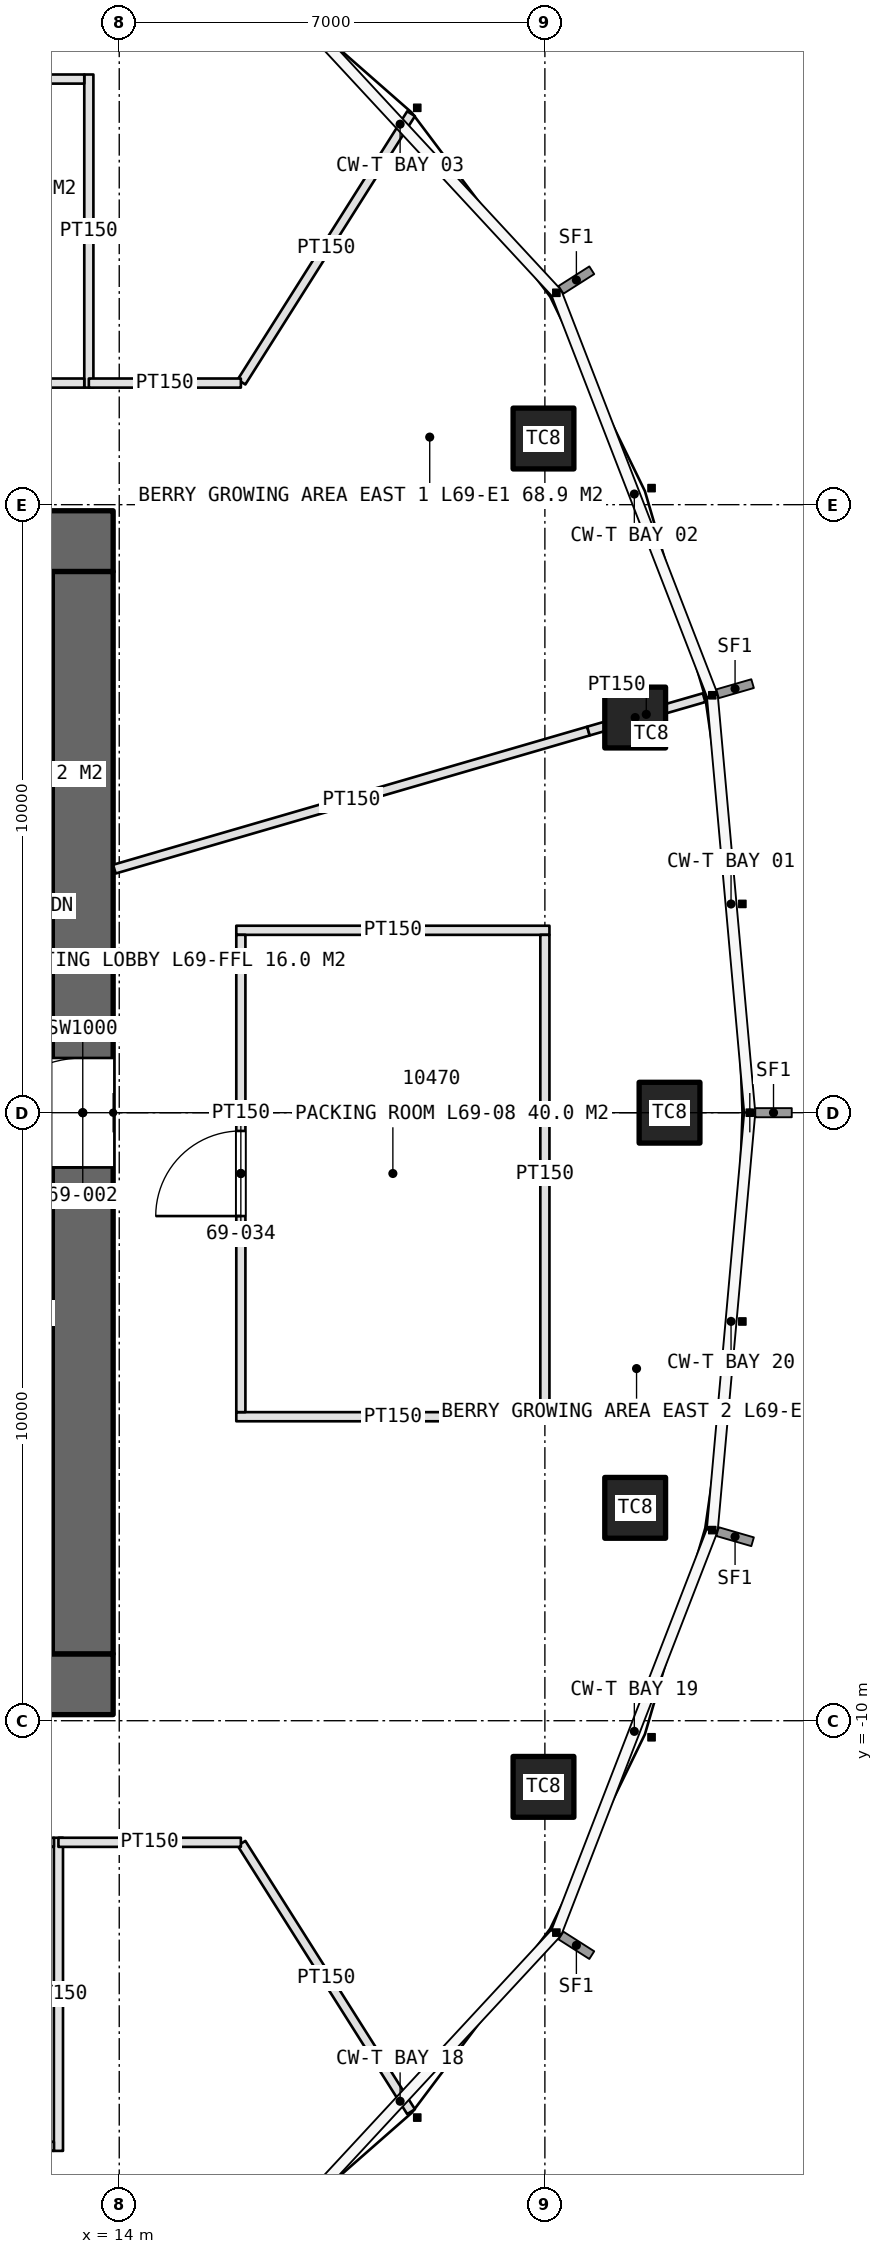
"""IFC4 building model, lengths in metres.
Left out: names, types, materials, properties, quantities, classifications, styles, units other than length and angle.
Written with IfcOpenShell. Run it as: python <this file> out.ifc"""

import sys

from ifc_helpers import new_model, si_unit, direction, frame, frame_2d, origin, origin_2d, place, context, subcontext, project, spatial, rectangle, extrude, element, fill, save


model = new_model("IFC4")
c1 = context("Model", 3, precision=1e-05, world=origin(), true_north=direction((0.0, 1.0)))
c2 = subcontext(c1, "Body", "Model", "MODEL_VIEW")
j1 = project(units=[si_unit("LENGTHUNIT", "METRE"), si_unit("PLANEANGLEUNIT", "RADIAN")], contexts=[c1])
p1 = place(None, origin())
s1 = spatial("IfcSite", under=j1, at=p1, CompositionType="ELEMENT")
p2 = place(p1, origin())
s2 = spatial("IfcBuilding", under=s1, at=p2, CompositionType="ELEMENT")
p3 = place(p2, frame((0.0, 0.0, 309.0)))
s3 = spatial("IfcBuildingStorey", under=s2, at=p3, CompositionType="ELEMENT", Elevation=309.0)
p4 = place(p3, frame((-13.9, -9.4, 0.0), z_axis=(0.0, 0.0, 1.0), x_axis=(1.0, 0.0, 0.0)))
e1 = element("IfcWall", 1, at=p4, inside=s3, PredefinedType="SHEAR", context=c2, shape_type="SweptSolid", body=[
    extrude(rectangle(XDim=27.8, YDim=1.0, at=frame_2d((13.9, 0.0))), origin(), (0.0, 0.0, 1.0), 4.2),
])
p5 = place(p4, frame((22.95, 0.0, 0.0)))
e2 = element("IfcOpeningElement", 2, at=p5, cuts=e1, PredefinedType="OPENING", context=c2, shape_type="SweptSolid", body=[
    extrude(rectangle(XDim=2.2, YDim=2.7, at=frame_2d((1.1, 1.35))), frame((0.0, 0.51, 0.0), z_axis=(0.0, -1.0, 0.0), x_axis=(1.0, 0.0, 0.0)), (0.0, 0.0, 1.0), 1.02),
])
p6 = place(p3, frame((13.9, 9.4, 0.0), z_axis=(0.0, 0.0, 1.0), x_axis=(-1.0, 0.0, 0.0)))
e3 = element("IfcWall", 3, at=p6, inside=s3, PredefinedType="SHEAR", context=c2, shape_type="SweptSolid", body=[
    extrude(rectangle(XDim=27.8, YDim=1.0, at=frame_2d((13.9, 0.0))), origin(), (0.0, 0.0, 1.0), 4.2),
])
p7 = place(p6, frame((23.9, 0.0, 0.0)))
e4 = element("IfcOpeningElement", 4, at=p7, cuts=e3, PredefinedType="OPENING", context=c2, shape_type="SweptSolid", body=[
    extrude(rectangle(XDim=1.0, YDim=2.4, at=frame_2d((0.5, 1.2))), frame((0.0, 0.51, 0.0), z_axis=(0.0, -1.0, 0.0), x_axis=(1.0, 0.0, 0.0)), (0.0, 0.0, 1.0), 1.02),
])
p8 = place(p6, frame((13.0, 0.0, 0.0)))
e5 = element("IfcOpeningElement", 5, at=p8, cuts=e3, PredefinedType="OPENING", context=c2, shape_type="SweptSolid", body=[
    extrude(rectangle(XDim=1.8, YDim=2.4, at=frame_2d((0.9, 1.2))), frame((0.0, 0.51, 0.0), z_axis=(0.0, -1.0, 0.0), x_axis=(1.0, 0.0, 0.0)), (0.0, 0.0, 1.0), 1.02),
])
p9 = place(p3, frame((13.4, -8.9, 0.0), z_axis=(0.0, 0.0, 1.0), x_axis=(0.0, 1.0, 0.0)))
e6 = element("IfcWall", 6, at=p9, inside=s3, PredefinedType="SHEAR", context=c2, shape_type="SweptSolid", body=[
    extrude(rectangle(XDim=17.8, YDim=1.0, at=frame_2d((8.9, 0.0))), origin(), (0.0, 0.0, 1.0), 4.2),
])
p10 = place(p9, frame((8.0, 0.0, 0.0)))
e7 = element("IfcOpeningElement", 7, at=p10, cuts=e6, PredefinedType="OPENING", context=c2, shape_type="SweptSolid", body=[
    extrude(rectangle(XDim=1.8, YDim=2.4, at=frame_2d((0.9, 1.2))), frame((0.0, 0.51, 0.0), z_axis=(0.0, -1.0, 0.0), x_axis=(1.0, 0.0, 0.0)), (0.0, 0.0, 1.0), 1.02),
])
p11 = place(p3, frame((7.2, 1.6, 0.0), z_axis=(0.0, 0.0, 1.0), x_axis=(1.0, 0.0, 0.0)))
e8 = element("IfcWall", 8, at=p11, inside=s3, PredefinedType="SHEAR", context=c2, shape_type="SweptSolid", body=[
    extrude(rectangle(XDim=5.7, YDim=0.4, at=frame_2d((2.85, 0.0))), origin(), (0.0, 0.0, 1.0), 4.2),
])
p12 = place(p11, frame((0.7, 0.0, 0.0)))
e9 = element("IfcOpeningElement", 9, at=p12, cuts=e8, PredefinedType="OPENING", context=c2, shape_type="SweptSolid", body=[
    extrude(rectangle(XDim=1.0, YDim=2.4, at=frame_2d((0.5, 1.2))), frame((0.0, 0.21, 0.0), z_axis=(0.0, -1.0, 0.0), x_axis=(1.0, 0.0, 0.0)), (0.0, 0.0, 1.0), 0.42),
])
p13 = place(p3, frame((7.2, -1.6, 0.0), z_axis=(0.0, 0.0, 1.0), x_axis=(1.0, 0.0, 0.0)))
e10 = element("IfcWall", 10, at=p13, inside=s3, PredefinedType="SHEAR", context=c2, shape_type="SweptSolid", body=[
    extrude(rectangle(XDim=5.7, YDim=0.4, at=frame_2d((2.85, 0.0))), origin(), (0.0, 0.0, 1.0), 4.2),
])
p14 = place(p13, frame((0.9, 0.0, 0.0)))
e11 = element("IfcOpeningElement", 11, at=p14, cuts=e10, PredefinedType="OPENING", context=c2, shape_type="SweptSolid", body=[
    extrude(rectangle(XDim=1.3, YDim=2.4, at=frame_2d((0.65, 1.2))), frame((0.0, 0.21, 0.0), z_axis=(0.0, -1.0, 0.0), x_axis=(1.0, 0.0, 0.0)), (0.0, 0.0, 1.0), 0.42),
])
p15 = place(p13, frame((3.95, 0.0, 0.0)))
e12 = element("IfcOpeningElement", 12, at=p15, cuts=e10, PredefinedType="OPENING", context=c2, shape_type="SweptSolid", body=[
    extrude(rectangle(XDim=1.3, YDim=2.4, at=frame_2d((0.65, 1.2))), frame((0.0, 0.21, 0.0), z_axis=(0.0, -1.0, 0.0), x_axis=(1.0, 0.0, 0.0)), (0.0, 0.0, 1.0), 0.42),
])
p16 = place(p3, frame((7.2, -5.0, 0.0), z_axis=(0.0, 0.0, 1.0), x_axis=(1.0, 0.0, 0.0)))
e13 = element("IfcWall", 13, at=p16, inside=s3, PredefinedType="SHEAR", context=c2, shape_type="SweptSolid", body=[
    extrude(rectangle(XDim=5.7, YDim=0.4, at=frame_2d((2.85, 0.0))), origin(), (0.0, 0.0, 1.0), 4.2),
])
for number, where, z_axis, x_axis in (
    (14, (23.05, 0.0, 0.0), (0.0, 0.0, 1.0), (1.0, 0.0, 0.0)),
    (15, (22.485, 6.499, 0.0), (0.0, 0.0, 1.0), (1.0, 0.0, 0.0)),
    (16, (20.977, 11.088, 0.0), (0.0, 0.0, 1.0), (1.0, 0.0, 0.0)),
    (17, (20.977, -11.088, 0.0), (0.0, 0.0, 1.0), (1.0, 0.0, 0.0)),
    (18, (22.485, -6.499, 0.0), (0.0, 0.0, 1.0), (1.0, 0.0, 0.0)),
):
    element("IfcColumn", number, at=place(p3, frame(where, z_axis=z_axis, x_axis=x_axis)), inside=s3, PredefinedType="COLUMN", context=c2, shape_type="SweptSolid", body=[
        extrude(rectangle(XDim=1.0, YDim=1.0, at=origin_2d()), origin(), (0.0, 0.0, 1.0), 4.2),
    ])
p17 = place(p3, frame((13.0, -11.925, 0.0), z_axis=(0.0, 0.0, 1.0), x_axis=(0.0, -1.0, 0.0)))
e19 = element("IfcWall", 19, at=p17, inside=s3, PredefinedType="PARTITIONING", context=c2, shape_type="SweptSolid", body=[
    extrude(rectangle(XDim=5.15, YDim=0.15, at=frame_2d((2.575, 0.0))), origin(), (0.0, 0.0, 1.0), 3.0),
])
p18 = place(p3, frame((7.075, -12.0, 0.0), z_axis=(0.0, 0.0, 1.0), x_axis=(1.0, 0.0, 0.0)))
e20 = element("IfcWall", 20, at=p18, inside=s3, PredefinedType="PARTITIONING", context=c2, shape_type="SweptSolid", body=[
    extrude(rectangle(XDim=5.85, YDim=0.15, at=frame_2d((2.925, 0.0))), origin(), (0.0, 0.0, 1.0), 3.0),
])
p19 = place(p18, frame((2.225, 0.0, 0.0)))
e21 = element("IfcOpeningElement", 21, at=p19, cuts=e20, PredefinedType="OPENING", context=c2, shape_type="SweptSolid", body=[
    extrude(rectangle(XDim=1.4, YDim=2.4, at=frame_2d((0.7, 1.2))), frame((0.0, 0.085, 0.0), z_axis=(0.0, -1.0, 0.0), x_axis=(1.0, 0.0, 0.0)), (0.0, 0.0, 1.0), 0.17),
])
p20 = place(p3, frame((7.075, -17.0, 0.0), z_axis=(0.0, 0.0, 1.0), x_axis=(1.0, 0.0, 0.0)))
e22 = element("IfcWall", 22, at=p20, inside=s3, PredefinedType="PARTITIONING", context=c2, shape_type="SweptSolid", body=[
    extrude(rectangle(XDim=5.85, YDim=0.15, at=frame_2d((2.925, 0.0))), origin(), (0.0, 0.0, 1.0), 3.0),
])
for number, where, z_axis, x_axis in (
    (23, (15.925, -5.0, 0.0), (0.0, 0.0, 1.0), (1.0, 0.0, 0.0)),
    (24, (15.925, 3.0, 0.0), (0.0, 0.0, 1.0), (1.0, 0.0, 0.0)),
):
    element("IfcWall", number, at=place(p3, frame(where, z_axis=z_axis, x_axis=x_axis)), inside=s3, PredefinedType="PARTITIONING", context=c2, shape_type="SweptSolid", body=[
        extrude(rectangle(XDim=5.15, YDim=0.15, at=frame_2d((2.575, 0.0))), origin(), (0.0, 0.0, 1.0), 3.0),
    ])
p21 = place(p3, frame((16.0, -4.925, 0.0), z_axis=(0.0, 0.0, 1.0), x_axis=(0.0, 1.0, 0.0)))
e25 = element("IfcWall", 25, at=p21, inside=s3, PredefinedType="PARTITIONING", context=c2, shape_type="SweptSolid", body=[
    extrude(rectangle(XDim=7.85, YDim=0.15, at=frame_2d((3.925, 0.0))), origin(), (0.0, 0.0, 1.0), 3.0),
])
p22 = place(p21, frame((3.225, 0.0, 0.0)))
e26 = element("IfcOpeningElement", 26, at=p22, cuts=e25, PredefinedType="OPENING", context=c2, shape_type="SweptSolid", body=[
    extrude(rectangle(XDim=1.4, YDim=2.4, at=frame_2d((0.7, 1.2))), frame((0.0, 0.085, 0.0), z_axis=(0.0, -1.0, 0.0), x_axis=(1.0, 0.0, 0.0)), (0.0, 0.0, 1.0), 0.17),
])
p23 = place(p3, frame((21.0, -4.925, 0.0), z_axis=(0.0, 0.0, 1.0), x_axis=(0.0, 1.0, 0.0)))
e27 = element("IfcWall", 27, at=p23, inside=s3, PredefinedType="PARTITIONING", context=c2, shape_type="SweptSolid", body=[
    extrude(rectangle(XDim=7.85, YDim=0.15, at=frame_2d((3.925, 0.0))), origin(), (0.0, 0.0, 1.0), 3.0),
])
p24 = place(p3, frame((13.5, 11.925, 0.0), z_axis=(0.0, 0.0, 1.0), x_axis=(0.0, 1.0, 0.0)))
e28 = element("IfcWall", 28, at=p24, inside=s3, PredefinedType="PARTITIONING", context=c2, shape_type="SweptSolid", body=[
    extrude(rectangle(XDim=5.15, YDim=0.15, at=frame_2d((2.575, 0.0))), origin(), (0.0, 0.0, 1.0), 3.0),
])
p25 = place(p3, frame((8.575, 12.0, 0.0), z_axis=(0.0, 0.0, 1.0), x_axis=(1.0, 0.0, 0.0)))
e29 = element("IfcWall", 29, at=p25, inside=s3, PredefinedType="PARTITIONING", context=c2, shape_type="SweptSolid", body=[
    extrude(rectangle(XDim=4.85, YDim=0.15, at=frame_2d((2.425, 0.0))), origin(), (0.0, 0.0, 1.0), 3.0),
])
p26 = place(p25, frame((1.925, 0.0, 0.0)))
e30 = element("IfcOpeningElement", 30, at=p26, cuts=e29, PredefinedType="OPENING", context=c2, shape_type="SweptSolid", body=[
    extrude(rectangle(XDim=1.0, YDim=2.2, at=frame_2d((0.5, 1.1))), frame((0.0, 0.085, 0.0), z_axis=(0.0, -1.0, 0.0), x_axis=(1.0, 0.0, 0.0)), (0.0, 0.0, 1.0), 0.17),
])
p27 = place(p3, frame((8.575, 17.0, 0.0), z_axis=(0.0, 0.0, 1.0), x_axis=(1.0, 0.0, 0.0)))
e31 = element("IfcWall", 31, at=p27, inside=s3, PredefinedType="PARTITIONING", context=c2, shape_type="SweptSolid", body=[
    extrude(rectangle(XDim=4.85, YDim=0.15, at=frame_2d((2.425, 0.0))), origin(), (0.0, 0.0, 1.0), 3.0),
])
for number, where, z_axis, x_axis in (
    (32, (16.011, -12.017, 0.0), (0.0, 0.0, 1.0), (0.534, -0.845, 0.0)),
    (33, (16.011, 12.017, 0.0), (0.0, 0.0, 1.0), (0.534, 0.845, 0.0)),
):
    element("IfcWall", number, at=place(p3, frame(where, z_axis=z_axis, x_axis=x_axis)), inside=s3, PredefinedType="PARTITIONING", context=c2, shape_type="SweptSolid", body=[
        extrude(rectangle(XDim=5.22, YDim=0.15, at=frame_2d((2.61, 0.0))), origin(), (0.0, 0.0, 1.0), 3.0),
    ])
p28 = place(p3, frame((13.92, 4.006, 0.0), z_axis=(0.0, 0.0, 1.0), x_axis=(0.960105665242, 0.279637464534, 0.0)))
e34 = element("IfcWall", 34, at=p28, inside=s3, PredefinedType="PARTITIONING", context=c2, shape_type="SweptSolid", body=[
    extrude(rectangle(XDim=8.12, YDim=0.15, at=frame_2d((4.06, 0.0))), origin(), (0.0, 0.0, 1.0), 3.0),
])
p29 = place(p3, frame((21.716, 6.277, 0.0), z_axis=(0.0, 0.0, 1.0), x_axis=(0.960705414675, 0.277570002366, 0.0)))
e35 = element("IfcWall", 35, at=p29, inside=s3, PredefinedType="PARTITIONING", context=c2, shape_type="SweptSolid", body=[
    extrude(rectangle(XDim=1.98, YDim=0.15, at=frame_2d((0.99, 0.0))), origin(), (0.0, 0.0, 1.0), 3.0),
])
p30 = place(p3, frame((16.0, 12.0, 0.0), z_axis=(0.0, 0.0, 1.0), x_axis=(-1.0, 0.0, 0.0)))
e36 = element("IfcWall", 36, at=p30, inside=s3, PredefinedType="PARTITIONING", context=c2, shape_type="SweptSolid", body=[
    extrude(rectangle(XDim=2.5, YDim=0.15, at=frame_2d((1.25, 0.0))), origin(), (0.0, 0.0, 1.0), 3.0),
])
p31 = place(p3, frame((13.0, -12.0, 0.0), z_axis=(0.0, 0.0, 1.0), x_axis=(1.0, 0.0, 0.0)))
e37 = element("IfcWall", 37, at=p31, inside=s3, PredefinedType="PARTITIONING", context=c2, shape_type="SweptSolid", body=[
    extrude(rectangle(XDim=3.0, YDim=0.15, at=frame_2d((1.5, 0.0))), origin(), (0.0, 0.0, 1.0), 3.0),
])
p32 = place(p10, origin())
e38 = element("IfcDoor", 38, at=p32, inside=s3, OperationType="DOUBLE_DOOR_SINGLE_SWING", PredefinedType="DOOR", context=c2, shape_type="SweptSolid", body=[
    extrude(rectangle(XDim=1.8, YDim=2.4, at=frame_2d((0.9, 1.2))), frame((0.0, 0.025, 0.0), z_axis=(0.0, -1.0, 0.0), x_axis=(1.0, 0.0, 0.0)), (0.0, 0.0, 1.0), 0.05),
])
fill(e7, e38)
p33 = place(p22, origin())
e39 = element("IfcDoor", 39, at=p33, inside=s3, OperationType="DOUBLE_DOOR_DOUBLE_SWING", PredefinedType="DOOR", context=c2, shape_type="SweptSolid", body=[
    extrude(rectangle(XDim=1.4, YDim=2.4, at=frame_2d((0.7, 1.2))), frame((0.0, 0.025, 0.0), z_axis=(0.0, -1.0, 0.0), x_axis=(1.0, 0.0, 0.0)), (0.0, 0.0, 1.0), 0.05),
])
fill(e26, e39)
save(model, sys.argv[1])
